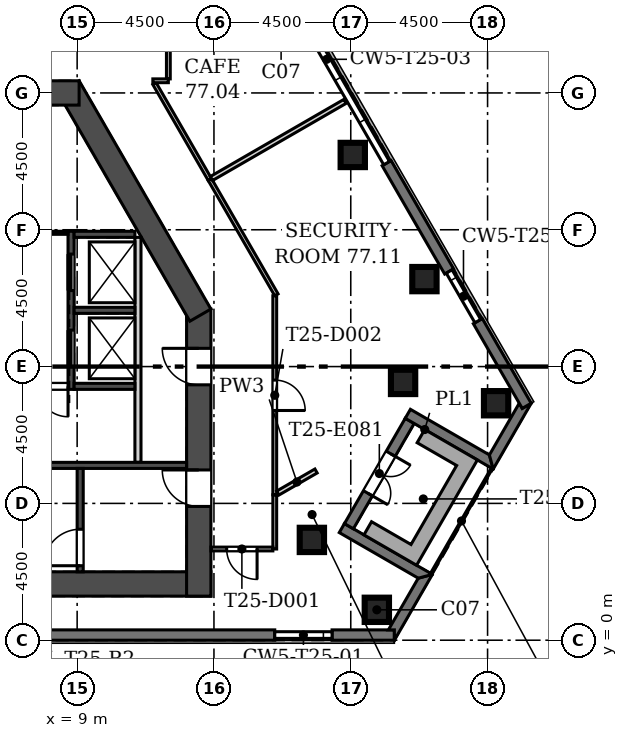
"""IFC4 building model, lengths in metres.
Left out: names, types, materials, properties, quantities, classifications, styles, units other than length and angle.
Written with IfcOpenShell. Run it as: python <this file> out.ifc"""

import sys

from ifc_helpers import new_model, si_unit, direction, frame, frame_2d, origin, origin_2d, place, context, subcontext, project, spatial, polyline, rectangle, outline, extrude, element, fill, save


model = new_model("IFC4")
c1 = context("Model", 3, precision=1e-05, world=origin(), true_north=direction((0.0, 1.0)))
c2 = subcontext(c1, "Body", "Model", "MODEL_VIEW")
j1 = project(units=[si_unit("LENGTHUNIT", "METRE"), si_unit("PLANEANGLEUNIT", "RADIAN")], contexts=[c1])
p1 = place(None, origin())
s1 = spatial("IfcSite", under=j1, at=p1, CompositionType="ELEMENT")
p2 = place(p1, origin())
s2 = spatial("IfcBuilding", under=s1, at=p2, CompositionType="ELEMENT")
p3 = place(p2, frame((0.0, 0.0, 339.3)))
s3 = spatial("IfcBuildingStorey", under=s2, at=p3, CompositionType="ELEMENT", Elevation=339.3)
for number, where, z_axis, x_axis in (
    (1, (18.858, 1.0, 0.0), (0.0, 0.0, 1.0), (1.0, 0.0, 0.0)),
    (2, (16.721, 3.299, 0.0), (0.0, 0.0, 1.0), (1.0, 0.0, 0.0)),
    (3, (19.721, 8.495, 0.0), (0.0, 0.0, 1.0), (1.0, 0.0, 0.0)),
    (4, (22.78, 7.794, 0.0), (0.0, 0.0, 1.0), (1.0, 0.0, 0.0)),
    (5, (20.423, 11.877, 0.0), (0.0, 0.0, 1.0), (1.0, 0.0, 0.0)),
    (6, (18.066, 15.96, 0.0), (0.0, 0.0, 1.0), (1.0, 0.0, 0.0)),
):
    element("IfcColumn", number, at=place(p3, frame(where, z_axis=z_axis, x_axis=x_axis)), inside=s3, PredefinedType="COLUMN", context=c2, shape_type="SweptSolid", body=[
        extrude(rectangle(XDim=0.8, YDim=0.8, at=origin_2d()), origin(), (0.0, 0.0, 1.0), 5.4),
    ])
p4 = place(p3, frame((-13.4, 1.85, 0.0), z_axis=(0.0, 0.0, 1.0), x_axis=(1.0, 0.0, 0.0)))
e7 = element("IfcWall", 7, at=p4, inside=s3, PredefinedType="SHEAR", context=c2, shape_type="SweptSolid", body=[
    extrude(rectangle(XDim=26.8, YDim=0.8, at=frame_2d((13.4, 0.0))), origin(), (0.0, 0.0, 1.0), 5.4),
])
p5 = place(p3, frame((13.0, 1.45, 0.0), z_axis=(0.0, 0.0, 1.0), x_axis=(0.0, 1.0, 0.0)))
e8 = element("IfcWall", 8, at=p5, inside=s3, PredefinedType="SHEAR", context=c2, shape_type="SweptSolid", body=[
    extrude(rectangle(XDim=9.442, YDim=0.8, at=frame_2d((4.721, 0.0))), origin(), (0.0, 0.0, 1.0), 5.4),
])
p6 = place(p5, frame((2.95, 0.0, 0.0)))
e9 = element("IfcOpeningElement", 9, at=p6, cuts=e8, PredefinedType="OPENING", context=c2, shape_type="SweptSolid", body=[
    extrude(rectangle(XDim=1.2, YDim=2.1, at=frame_2d((0.6, 1.05))), frame((0.0, 0.41, 0.0), z_axis=(0.0, -1.0, 0.0), x_axis=(1.0, 0.0, 0.0)), (0.0, 0.0, 1.0), 0.82),
])
p7 = place(p5, frame((6.95, 0.0, 0.0)))
e10 = element("IfcOpeningElement", 10, at=p7, cuts=e8, PredefinedType="OPENING", context=c2, shape_type="SweptSolid", body=[
    extrude(rectangle(XDim=1.2, YDim=2.1, at=frame_2d((0.6, 1.05))), frame((0.0, 0.41, 0.0), z_axis=(0.0, -1.0, 0.0), x_axis=(1.0, 0.0, 0.0)), (0.0, 0.0, 1.0), 0.82),
])
p8 = place(p3, frame((13.054, 10.692, 0.0), z_axis=(0.0, 0.0, 1.0), x_axis=(-0.500015780397, 0.866016292776, 0.0)))
e11 = element("IfcWall", 11, at=p8, inside=s3, PredefinedType="SHEAR", context=c2, shape_type="SweptSolid", body=[
    extrude(rectangle(XDim=8.67, YDim=0.8, at=frame_2d((4.335, 0.0))), origin(), (0.0, 0.0, 1.0), 5.4),
])
p9 = place(p3, frame((9.065, 18.0, 0.0), z_axis=(0.0, 0.0, 1.0), x_axis=(-1.0, 0.0, 0.0)))
e12 = element("IfcWall", 12, at=p9, inside=s3, PredefinedType="SHEAR", context=c2, shape_type="SweptSolid", body=[
    extrude(rectangle(XDim=18.13, YDim=0.8, at=frame_2d((9.065, 0.0))), origin(), (0.0, 0.0, 1.0), 5.4),
])
p10 = place(p9, frame((8.365, 0.0, 0.0)))
e13 = element("IfcOpeningElement", 13, at=p10, cuts=e12, PredefinedType="OPENING", context=c2, shape_type="SweptSolid", body=[
    extrude(rectangle(XDim=1.4, YDim=2.1, at=frame_2d((0.7, 1.05))), frame((0.0, 0.41, 0.0), z_axis=(0.0, -1.0, 0.0), x_axis=(1.0, 0.0, 0.0)), (0.0, 0.0, 1.0), 0.82),
])
p11 = place(p9, frame((11.065, 0.0, 0.0)))
e14 = element("IfcOpeningElement", 14, at=p11, cuts=e12, PredefinedType="OPENING", context=c2, shape_type="SweptSolid", body=[
    extrude(rectangle(XDim=6.0, YDim=2.4, at=frame_2d((3.0, 1.2))), frame((0.0, 0.41, 0.0), z_axis=(0.0, -1.0, 0.0), x_axis=(1.0, 0.0, 0.0)), (0.0, 0.0, 1.0), 0.82),
])
p12 = place(p9, frame((1.065, 0.0, 0.0)))
e15 = element("IfcOpeningElement", 15, at=p12, cuts=e12, PredefinedType="OPENING", context=c2, shape_type="SweptSolid", body=[
    extrude(rectangle(XDim=6.0, YDim=2.4, at=frame_2d((3.0, 1.2))), frame((0.0, 0.41, 0.0), z_axis=(0.0, -1.0, 0.0), x_axis=(1.0, 0.0, 0.0)), (0.0, 0.0, 1.0), 0.82),
])
p13 = place(p3, frame((-19.435, 0.17, 0.0), z_axis=(0.0, 0.0, 1.0), x_axis=(1.0, 0.0, 0.0)))
e16 = element("IfcWall", 16, at=p13, inside=s3, PredefinedType="SOLIDWALL", context=c2, shape_type="SweptSolid", body=[
    extrude(rectangle(XDim=34.935, YDim=0.34, at=frame_2d((17.468, 0.0))), origin(), (0.0, 0.0, 1.0), 4.6),
])
p14 = place(p3, frame((17.385, 0.17, 0.0), z_axis=(0.0, 0.0, 1.0), x_axis=(1.0, 0.0, 0.0)))
e17 = element("IfcWall", 17, at=p14, inside=s3, PredefinedType="SOLIDWALL", context=c2, shape_type="SweptSolid", body=[
    extrude(rectangle(XDim=2.05, YDim=0.34, at=frame_2d((1.025, 0.0))), origin(), (0.0, 0.0, 1.0), 4.6),
])
p15 = place(p3, origin())
e18 = element("IfcWall", 18, at=p15, inside=s3, PredefinedType="SOLIDWALL", context=c2, shape_type="SweptSolid", body=[
    extrude(outline(polyline([(20.686, 2.166), (19.435, -0.001), (19.434, -0.001), (19.434, 0.339), (19.238, 0.339), (20.22, 2.041), (20.686, 2.166), (20.686, 2.166)])), origin(), (0.0, 0.0, 1.0), 4.6),
])
p16 = place(p3, origin())
e19 = element("IfcWall", 19, at=p16, inside=s3, PredefinedType="SOLIDWALL", context=c2, shape_type="SweptSolid", body=[
    extrude(outline(polyline([(17.622, 3.54), (17.792, 3.836), (18.087, 3.666), (20.686, 2.165), (20.686, 2.165), (20.22, 2.04), (17.622, 3.54)])), origin(), (0.0, 0.0, 1.0), 4.6),
])
p17 = place(p3, frame((17.94, 3.75, 0.0), z_axis=(0.0, 0.0, 1.0), x_axis=(0.49999894854, 0.866026010844, 0.0)))
e20 = element("IfcWall", 20, at=p17, inside=s3, PredefinedType="SOLIDWALL", context=c2, shape_type="SweptSolid", body=[
    extrude(rectangle(XDim=4.0, YDim=0.34, at=frame_2d((2.0, 0.0))), origin(), (0.0, 0.0, 1.0), 4.6),
])
p18 = place(p17, frame((1.25, 0.0, 0.0)))
e21 = element("IfcOpeningElement", 21, at=p18, cuts=e20, PredefinedType="OPENING", context=c2, shape_type="SweptSolid", body=[
    extrude(rectangle(XDim=1.5, YDim=2.4, at=frame_2d((0.75, 1.2))), frame((0.0, 0.18, 0.0), z_axis=(0.0, -1.0, 0.0), x_axis=(1.0, 0.0, 0.0)), (0.0, 0.0, 1.0), 0.36),
])
p19 = place(p3, origin())
e22 = element("IfcWall", 22, at=p19, inside=s3, PredefinedType="SOLIDWALL", context=c2, shape_type="SweptSolid", body=[
    extrude(outline(polyline([(22.686, 5.628), (20.087, 7.129), (19.792, 7.299), (19.962, 7.594), (22.561, 6.094), (22.686, 5.628), (22.686, 5.628)])), origin(), (0.0, 0.0, 1.0), 4.6),
])
p20 = place(p3, origin())
e23 = element("IfcWall", 23, at=p20, inside=s3, PredefinedType="SOLIDWALL", context=c2, shape_type="SweptSolid", body=[
    extrude(outline(polyline([(23.542, 7.795), (23.641, 7.625), (23.936, 7.795), (23.936, 7.795), (22.685, 5.628), (22.685, 5.628), (22.56, 6.094), (23.542, 7.795)])), origin(), (0.0, 0.0, 1.0), 4.6),
])
p21 = place(p3, frame((23.788, 7.709, 0.0), z_axis=(0.0, 0.0, 1.0), x_axis=(-0.500039914135, 0.866002358122, 0.0)))
e24 = element("IfcWall", 24, at=p21, inside=s3, PredefinedType="SOLIDWALL", context=c2, shape_type="SweptSolid", body=[
    extrude(rectangle(XDim=3.218, YDim=0.34, at=frame_2d((1.609, 0.0))), origin(), (0.0, 0.0, 1.0), 4.6),
])
p22 = place(p3, frame((21.237, 12.128, 0.0), z_axis=(0.0, 0.0, 1.0), x_axis=(-0.500018604663, 0.866014662111, 0.0)))
e25 = element("IfcWall", 25, at=p22, inside=s3, PredefinedType="SOLIDWALL", context=c2, shape_type="SweptSolid", body=[
    extrude(rectangle(XDim=4.115, YDim=0.34, at=frame_2d((2.058, 0.0))), origin(), (0.0, 0.0, 1.0), 4.6),
])
p23 = place(p3, origin())
e26 = element("IfcWall", 26, at=p23, inside=s3, PredefinedType="USERDEFINED", context=c2, shape_type="SweptSolid", body=[
    extrude(outline(polyline([(18.433, 3.465), (19.732, 2.715), (19.732, 2.715), (20.165, 2.465), (22.165, 5.929), (20.433, 6.929), (20.183, 6.496), (21.482, 5.746), (19.982, 3.148), (18.683, 3.898), (18.433, 3.465)])), origin(), (0.0, 0.0, 1.0), 1.1),
])
p24 = place(p3, frame((11.0, 5.85, 0.0), z_axis=(0.0, 0.0, 1.0), x_axis=(0.0, 1.0, 0.0)))
e27 = element("IfcWall", 27, at=p24, inside=s3, PredefinedType="SOLIDWALL", context=c2, shape_type="SweptSolid", body=[
    extrude(rectangle(XDim=7.4, YDim=0.2, at=frame_2d((3.7, 0.0))), origin(), (0.0, 0.0, 1.0), 4.6),
])
p25 = place(p3, frame((8.8, 8.25, -0.4), z_axis=(0.0, 0.0, 1.0), x_axis=(0.0, 1.0, 0.0)))
e28 = element("IfcWall", 28, at=p25, inside=s3, PredefinedType="SOLIDWALL", context=c2, shape_type="SweptSolid", body=[
    extrude(rectangle(XDim=5.2, YDim=0.2, at=frame_2d((2.6, 0.0))), origin(), (0.0, 0.0, 1.0), 5.0),
])
p26 = place(p25, frame((0.75, 0.0, 0.4)))
e29 = element("IfcOpeningElement", 29, at=p26, cuts=e28, PredefinedType="OPENING", context=c2, shape_type="SweptSolid", body=[
    extrude(rectangle(XDim=1.2, YDim=2.1, at=frame_2d((0.6, 1.05))), frame((0.0, 0.11, 0.0), z_axis=(0.0, -1.0, 0.0), x_axis=(1.0, 0.0, 0.0)), (0.0, 0.0, 1.0), 0.22),
])
p27 = place(p25, frame((3.25, 0.0, 0.4)))
e30 = element("IfcOpeningElement", 30, at=p27, cuts=e28, PredefinedType="OPENING", context=c2, shape_type="SweptSolid", body=[
    extrude(rectangle(XDim=1.2, YDim=2.1, at=frame_2d((0.6, 1.05))), frame((0.0, 0.11, 0.0), z_axis=(0.0, -1.0, 0.0), x_axis=(1.0, 0.0, 0.0)), (0.0, 0.0, 1.0), 0.22),
])
p28 = place(p3, frame((8.9, 8.35, -0.4), z_axis=(0.0, 0.0, 1.0), x_axis=(1.0, 0.0, 0.0)))
e31 = element("IfcWall", 31, at=p28, inside=s3, PredefinedType="SOLIDWALL", context=c2, shape_type="SweptSolid", body=[
    extrude(rectangle(XDim=2.0, YDim=0.2, at=frame_2d((1.0, 0.0))), origin(), (0.0, 0.0, 1.0), 5.0),
])
p29 = place(p3, frame((1.2, 5.75, -0.4), z_axis=(0.0, 0.0, 1.0), x_axis=(1.0, 0.0, 0.0)))
e32 = element("IfcWall", 32, at=p29, inside=s3, PredefinedType="SOLIDWALL", context=c2, shape_type="SweptSolid", body=[
    extrude(rectangle(XDim=11.4, YDim=0.2, at=frame_2d((5.7, 0.0))), origin(), (0.0, 0.0, 1.0), 5.0),
])
p30 = place(p3, frame((9.1, 2.25, -0.4), z_axis=(0.0, 0.0, 1.0), x_axis=(0.0, 1.0, 0.0)))
e33 = element("IfcWall", 33, at=p30, inside=s3, PredefinedType="SOLIDWALL", context=c2, shape_type="SweptSolid", body=[
    extrude(rectangle(XDim=3.4, YDim=0.2, at=frame_2d((1.7, 0.0))), origin(), (0.0, 0.0, 1.0), 5.0),
])
p31 = place(p30, frame((0.2, 0.0, 0.4)))
e34 = element("IfcOpeningElement", 34, at=p31, cuts=e33, PredefinedType="OPENING", context=c2, shape_type="SweptSolid", body=[
    extrude(rectangle(XDim=1.2, YDim=2.1, at=frame_2d((0.6, 1.05))), frame((0.0, 0.11, 0.0), z_axis=(0.0, -1.0, 0.0), x_axis=(1.0, 0.0, 0.0)), (0.0, 0.0, 1.0), 0.22),
])
for number, where, z_axis, x_axis in (
    (35, (8.9, 10.85, -0.4), (0.0, 0.0, 1.0), (1.0, 0.0, 0.0)),
    (36, (8.9, 13.35, -0.4), (0.0, 0.0, 1.0), (1.0, 0.0, 0.0)),
):
    element("IfcWall", number, at=place(p3, frame(where, z_axis=z_axis, x_axis=x_axis)), inside=s3, PredefinedType="SOLIDWALL", context=c2, shape_type="SweptSolid", body=[
        extrude(rectangle(XDim=2.0, YDim=0.2, at=frame_2d((1.0, 0.0))), origin(), (0.0, 0.0, 1.0), 5.0),
    ])
p32 = place(p3, frame((5.9, 13.4, 0.0), z_axis=(0.0, 0.0, 1.0), x_axis=(1.0, 0.0, 0.0)))
e37 = element("IfcWall", 37, at=p32, inside=s3, PredefinedType="PARTITIONING", context=c2, shape_type="SweptSolid", body=[
    extrude(rectangle(XDim=2.8, YDim=0.1, at=frame_2d((1.4, 0.0))), origin(), (0.0, 0.0, 1.0), 4.6),
])
p33 = place(p32, frame((0.7, 0.0, 0.0)))
e38 = element("IfcOpeningElement", 38, at=p33, cuts=e37, PredefinedType="OPENING", context=c2, shape_type="SweptSolid", body=[
    extrude(rectangle(XDim=1.4, YDim=2.1, at=frame_2d((0.7, 1.05))), frame((0.0, 0.06, 0.0), z_axis=(0.0, -1.0, 0.0), x_axis=(1.0, 0.0, 0.0)), (0.0, 0.0, 1.0), 0.12),
])
p34 = place(p3, frame((5.9, 8.35, 0.0), z_axis=(0.0, 0.0, 1.0), x_axis=(1.0, 0.0, 0.0)))
e39 = element("IfcWall", 39, at=p34, inside=s3, PredefinedType="SOLIDWALL", context=c2, shape_type="SweptSolid", body=[
    extrude(rectangle(XDim=2.8, YDim=0.2, at=frame_2d((1.4, 0.0))), origin(), (0.0, 0.0, 1.0), 4.6),
])
p35 = place(p34, frame((1.8, 0.0, 0.0)))
e40 = element("IfcOpeningElement", 40, at=p35, cuts=e39, PredefinedType="OPENING", context=c2, shape_type="SweptSolid", body=[
    extrude(rectangle(XDim=1.0, YDim=2.1, at=frame_2d((0.5, 1.05))), frame((0.0, 0.11, 0.0), z_axis=(0.0, -1.0, 0.0), x_axis=(1.0, 0.0, 0.0)), (0.0, 0.0, 1.0), 0.22),
])
p36 = place(p3, frame((11.544, 18.306, 0.0), z_axis=(0.0, 0.0, 1.0), x_axis=(0.500007048974, -0.866021334019, 0.0)))
e41 = element("IfcWall", 41, at=p36, inside=s3, PredefinedType="PARTITIONING", context=c2, shape_type="SweptSolid", body=[
    extrude(rectangle(XDim=3.639, YDim=0.125, at=frame_2d((1.819, 0.0))), origin(), (0.0, 0.0, 1.0), 4.6),
])
p37 = place(p3, frame((15.5, 4.782, 0.0), z_axis=(0.0, 0.0, 1.0), x_axis=(0.0, -1.0, 0.0)))
e42 = element("IfcWall", 42, at=p37, inside=s3, PredefinedType="PARTITIONING", context=c2, shape_type="SweptSolid", body=[
    extrude(rectangle(XDim=1.782, YDim=0.125, at=frame_2d((0.891, 0.0))), origin(), (0.0, 0.0, 1.0), 4.6),
])
p38 = place(p3, frame((15.438, 3.0, 0.0), z_axis=(0.0, 0.0, 1.0), x_axis=(-1.0, 0.0, 0.0)))
e43 = element("IfcWall", 43, at=p38, inside=s3, PredefinedType="PARTITIONING", context=c2, shape_type="SweptSolid", body=[
    extrude(rectangle(XDim=2.038, YDim=0.125, at=frame_2d((1.019, 0.0))), origin(), (0.0, 0.0, 1.0), 4.6),
])
p39 = place(p38, frame((0.519, 0.0, 0.0)))
e44 = element("IfcOpeningElement", 44, at=p39, cuts=e43, PredefinedType="OPENING", context=c2, shape_type="SweptSolid", body=[
    extrude(rectangle(XDim=1.0, YDim=2.1, at=frame_2d((0.5, 1.05))), frame((0.0, 0.073, 0.0), z_axis=(0.0, -1.0, 0.0), x_axis=(1.0, 0.0, 0.0)), (0.0, 0.0, 1.0), 0.145),
])
p40 = place(p3, frame((13.364, 15.155, 0.0), z_axis=(0.0, 0.0, 1.0), x_axis=(0.499974900732, -0.866039894369, 0.0)))
e45 = element("IfcWall", 45, at=p40, inside=s3, PredefinedType="PARTITIONING", context=c2, shape_type="SweptSolid", body=[
    extrude(rectangle(XDim=4.381, YDim=0.125, at=frame_2d((2.19, 0.0))), origin(), (0.0, 0.0, 1.0), 4.6),
])
p41 = place(p3, frame((15.5, 11.33, 0.0), z_axis=(0.0, 0.0, 1.0), x_axis=(0.0, -1.0, 0.0)))
e46 = element("IfcWall", 46, at=p41, inside=s3, PredefinedType="PARTITIONING", context=c2, shape_type="SweptSolid", body=[
    extrude(rectangle(XDim=6.548, YDim=0.125, at=frame_2d((3.274, 0.0))), origin(), (0.0, 0.0, 1.0), 4.6),
])
p42 = place(p41, frame((2.774, 0.0, 0.0)))
e47 = element("IfcOpeningElement", 47, at=p42, cuts=e46, PredefinedType="OPENING", context=c2, shape_type="SweptSolid", body=[
    extrude(rectangle(XDim=1.0, YDim=2.1, at=frame_2d((0.5, 1.05))), frame((0.0, 0.073, 0.0), z_axis=(0.0, -1.0, 0.0), x_axis=(1.0, 0.0, 0.0)), (0.0, 0.0, 1.0), 0.145),
])
p43 = place(p3, frame((12.0, 20.837, 0.0), z_axis=(0.0, 0.0, 1.0), x_axis=(0.0, -1.0, 0.0)))
e48 = element("IfcWall", 48, at=p43, inside=s3, PredefinedType="PARTITIONING", context=c2, shape_type="SweptSolid", body=[
    extrude(rectangle(XDim=2.375, YDim=0.125, at=frame_2d((1.187, 0.0))), origin(), (0.0, 0.0, 1.0), 4.6),
])
p44 = place(p3, frame((12.0, 18.4, 0.0), z_axis=(0.0, 0.0, 1.0), x_axis=(-1.0, 0.0, 0.0)))
e49 = element("IfcWall", 49, at=p44, inside=s3, PredefinedType="PARTITIONING", context=c2, shape_type="SweptSolid", body=[
    extrude(rectangle(XDim=0.51, YDim=0.125, at=frame_2d((0.255, 0.0))), origin(), (0.0, 0.0, 1.0), 4.6),
])
p45 = place(p3, frame((17.811, 17.722, 0.0), z_axis=(0.0, 0.0, 1.0), x_axis=(-0.86601005171, -0.50002658963, 0.0)))
e50 = element("IfcWall", 50, at=p45, inside=s3, PredefinedType="PARTITIONING", context=c2, shape_type="SweptSolid", body=[
    extrude(rectangle(XDim=5.073, YDim=0.15, at=frame_2d((2.536, 0.0))), origin(), (0.0, 0.0, 1.0), 4.6),
])
p46 = place(p3, frame((15.6, 4.84, 0.0), z_axis=(0.0, 0.0, 1.0), x_axis=(0.866009128825, 0.500028187997, 0.0)))
e51 = element("IfcWall", 51, at=p46, inside=s3, PredefinedType="PARTITIONING", context=c2, shape_type="SweptSolid", body=[
    extrude(rectangle(XDim=1.452, YDim=0.15, at=frame_2d((0.726, 0.0))), origin(), (0.0, 0.0, 1.0), 4.6),
])
p47 = place(p18, frame((1.5, 0.0, 0.0), z_axis=(0.0, 0.0, 1.0), x_axis=(-1.0, 0.0, 0.0)))
e52 = element("IfcDoor", 52, at=p47, inside=s3, OperationType="DOUBLE_DOOR_SINGLE_SWING", PredefinedType="DOOR", context=c2, shape_type="SweptSolid", body=[
    extrude(rectangle(XDim=1.5, YDim=2.4, at=frame_2d((0.75, 1.2))), frame((0.0, 0.025, 0.0), z_axis=(0.0, -1.0, 0.0), x_axis=(1.0, 0.0, 0.0)), (0.0, 0.0, 1.0), 0.05),
])
fill(e21, e52)
p48 = place(p26, origin())
e53 = element("IfcDoor", 53, at=p48, inside=s3, OperationType="SLIDING_TO_LEFT", PredefinedType="DOOR", context=c2, shape_type="SweptSolid", body=[
    extrude(rectangle(XDim=1.2, YDim=2.1, at=frame_2d((0.6, 1.05))), frame((0.0, 0.025, 0.0), z_axis=(0.0, -1.0, 0.0), x_axis=(1.0, 0.0, 0.0)), (0.0, 0.0, 1.0), 0.05),
])
fill(e29, e53)
p49 = place(p27, origin())
e54 = element("IfcDoor", 54, at=p49, inside=s3, OperationType="SLIDING_TO_LEFT", PredefinedType="DOOR", context=c2, shape_type="SweptSolid", body=[
    extrude(rectangle(XDim=1.2, YDim=2.1, at=frame_2d((0.6, 1.05))), frame((0.0, 0.025, 0.0), z_axis=(0.0, -1.0, 0.0), x_axis=(1.0, 0.0, 0.0)), (0.0, 0.0, 1.0), 0.05),
])
fill(e30, e54)
p50 = place(p35, frame((1.0, 0.0, 0.0), z_axis=(0.0, 0.0, 1.0), x_axis=(-1.0, 0.0, 0.0)))
e55 = element("IfcDoor", 55, at=p50, inside=s3, OperationType="SINGLE_SWING_LEFT", PredefinedType="DOOR", context=c2, shape_type="SweptSolid", body=[
    extrude(rectangle(XDim=1.0, YDim=2.1, at=frame_2d((0.5, 1.05))), frame((0.0, 0.025, 0.0), z_axis=(0.0, -1.0, 0.0), x_axis=(1.0, 0.0, 0.0)), (0.0, 0.0, 1.0), 0.05),
])
fill(e40, e55)
p51 = place(p6, origin())
e56 = element("IfcDoor", 56, at=p51, inside=s3, OperationType="SINGLE_SWING_RIGHT", PredefinedType="DOOR", context=c2, shape_type="SweptSolid", body=[
    extrude(rectangle(XDim=1.2, YDim=2.1, at=frame_2d((0.6, 1.05))), frame((0.0, 0.025, 0.0), z_axis=(0.0, -1.0, 0.0), x_axis=(1.0, 0.0, 0.0)), (0.0, 0.0, 1.0), 0.05),
])
fill(e9, e56)
p52 = place(p31, origin())
e57 = element("IfcDoor", 57, at=p52, inside=s3, OperationType="SINGLE_SWING_LEFT", PredefinedType="DOOR", context=c2, shape_type="SweptSolid", body=[
    extrude(rectangle(XDim=1.2, YDim=2.1, at=frame_2d((0.6, 1.05))), frame((0.0, 0.025, 0.0), z_axis=(0.0, -1.0, 0.0), x_axis=(1.0, 0.0, 0.0)), (0.0, 0.0, 1.0), 0.05),
])
fill(e34, e57)
p53 = place(p7, origin())
e58 = element("IfcDoor", 58, at=p53, inside=s3, OperationType="SINGLE_SWING_RIGHT", PredefinedType="DOOR", context=c2, shape_type="SweptSolid", body=[
    extrude(rectangle(XDim=1.2, YDim=2.1, at=frame_2d((0.6, 1.05))), frame((0.0, 0.025, 0.0), z_axis=(0.0, -1.0, 0.0), x_axis=(1.0, 0.0, 0.0)), (0.0, 0.0, 1.0), 0.05),
])
fill(e10, e58)
p54 = place(p39, origin())
e59 = element("IfcDoor", 59, at=p54, inside=s3, OperationType="SINGLE_SWING_LEFT", PredefinedType="DOOR", context=c2, shape_type="SweptSolid", body=[
    extrude(rectangle(XDim=1.0, YDim=2.1, at=frame_2d((0.5, 1.05))), frame((0.0, 0.025, 0.0), z_axis=(0.0, -1.0, 0.0), x_axis=(1.0, 0.0, 0.0)), (0.0, 0.0, 1.0), 0.05),
])
fill(e44, e59)
p55 = place(p42, origin())
e60 = element("IfcDoor", 60, at=p55, inside=s3, OperationType="SINGLE_SWING_RIGHT", PredefinedType="DOOR", context=c2, shape_type="SweptSolid", body=[
    extrude(rectangle(XDim=1.0, YDim=2.1, at=frame_2d((0.5, 1.05))), frame((0.0, 0.025, 0.0), z_axis=(0.0, -1.0, 0.0), x_axis=(1.0, 0.0, 0.0)), (0.0, 0.0, 1.0), 0.05),
])
fill(e47, e60)
save(model, sys.argv[1])
